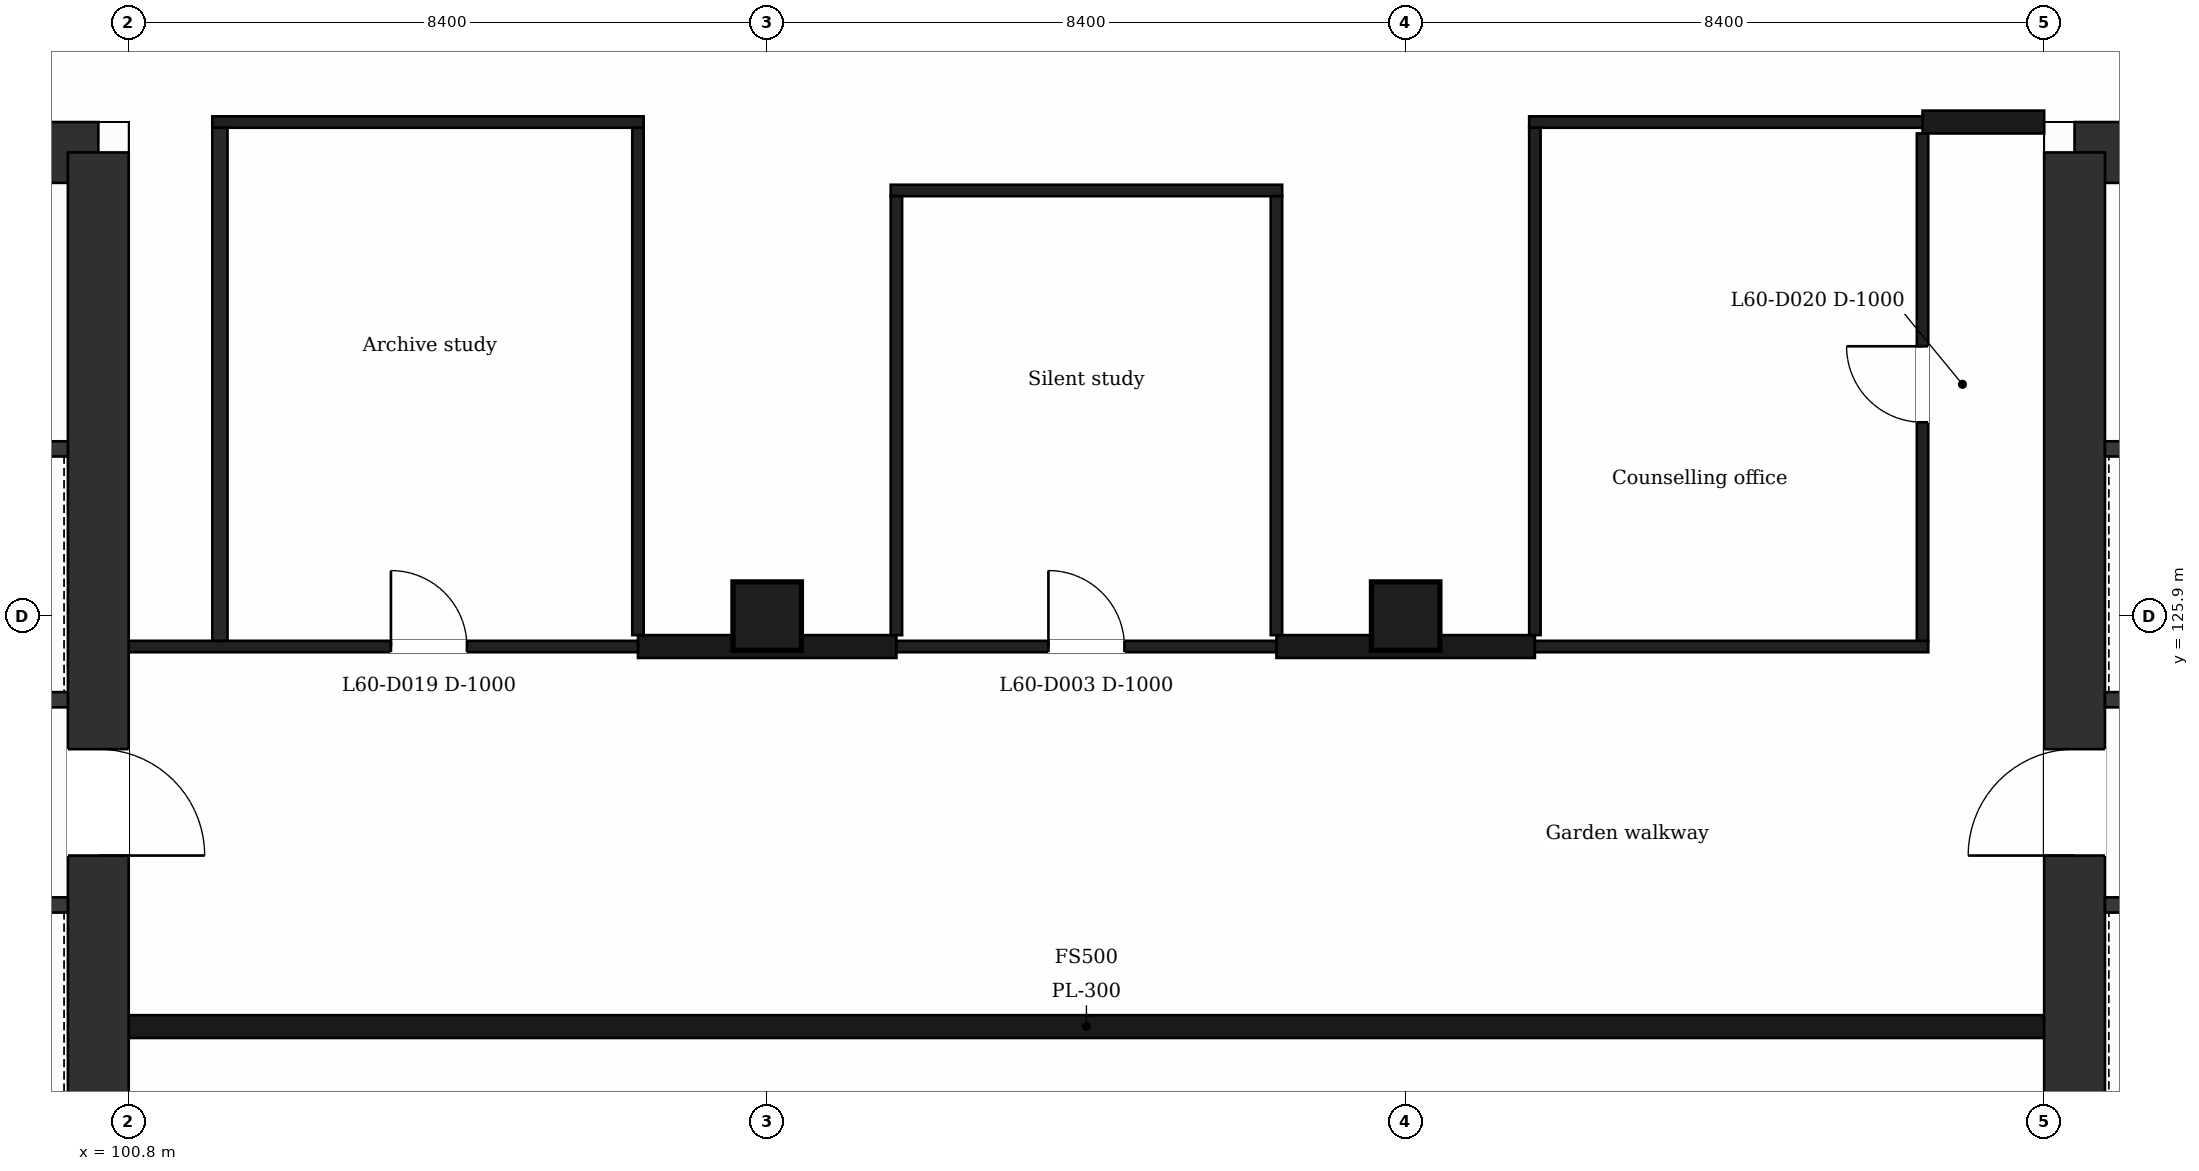
"""IFC4 building model, lengths in metres.
Left out: names, types, materials, properties, quantities, classifications, styles, units other than length and angle.
Written with IfcOpenShell. Run it as: python <this file> out.ifc"""

import sys

from ifc_helpers import new_model, si_unit, direction, frame, frame_2d, origin, origin_2d, place, context, subcontext, project, spatial, rectangle, extrude, element, fill, save


model = new_model("IFC4")
c1 = context("Model", 3, precision=1e-05, world=origin(), true_north=direction((0.0, 1.0)))
c2 = subcontext(c1, "Body", "Model", "MODEL_VIEW")
j1 = project(units=[si_unit("LENGTHUNIT", "METRE"), si_unit("PLANEANGLEUNIT", "RADIAN")], contexts=[c1])
p1 = place(None, origin())
s1 = spatial("IfcSite", under=j1, at=p1, CompositionType="ELEMENT")
p2 = place(p1, origin())
s2 = spatial("IfcBuilding", under=s1, at=p2, CompositionType="ELEMENT")
p3 = place(p2, frame((0.0, 0.0, 246.6)))
s3 = spatial("IfcBuildingStorey", under=s2, at=p3, CompositionType="ELEMENT", Elevation=246.6)
p4 = place(p3, frame((88.98, 132.0, 0.0), z_axis=(0.0, 0.0, 1.0), x_axis=(1.0, 0.0, 0.0)))
e1 = element("IfcWall", 1, at=p4, inside=s3, PredefinedType="SHEAR", context=c2, shape_type="SweptSolid", body=[
    extrude(rectangle(XDim=11.419, YDim=0.8, at=frame_2d((5.71, 0.0))), origin(), (0.0, 0.0, 1.0), 7.4),
])
p5 = place(p4, frame((6.833, 0.0, 0.0)))
e2 = element("IfcOpeningElement", 2, at=p5, cuts=e1, PredefinedType="OPENING", context=c2, shape_type="SweptSolid", body=[
    extrude(rectangle(XDim=1.2, YDim=2.1, at=frame_2d((0.6, 1.05))), frame((0.0, 0.41, 0.0), z_axis=(0.0, -1.0, 0.0), x_axis=(1.0, 0.0, 0.0)), (0.0, 0.0, 1.0), 0.82),
])
p6 = place(p3, frame((100.4, 132.0, 0.0), z_axis=(0.0, 0.0, 1.0), x_axis=(0.0, -1.0, 0.0)))
e3 = element("IfcWall", 3, at=p6, inside=s3, PredefinedType="SHEAR", context=c2, shape_type="SweptSolid", body=[
    extrude(rectangle(XDim=21.2, YDim=0.8, at=frame_2d((10.6, 0.0))), origin(), (0.0, 0.0, 1.0), 7.4),
])
p7 = place(p6, frame((7.85, 0.0, 0.0)))
e4 = element("IfcOpeningElement", 4, at=p7, cuts=e3, PredefinedType="OPENING", context=c2, shape_type="SweptSolid", body=[
    extrude(rectangle(XDim=1.4, YDim=2.1, at=frame_2d((0.7, 1.05))), frame((0.0, 0.41, 0.0), z_axis=(0.0, -1.0, 0.0), x_axis=(1.0, 0.0, 0.0)), (0.0, 0.0, 1.0), 0.82),
])
p8 = place(p3, frame((126.4, 132.0, 0.0), z_axis=(0.0, 0.0, 1.0), x_axis=(1.0, 0.0, 0.0)))
e5 = element("IfcWall", 5, at=p8, inside=s3, PredefinedType="SHEAR", context=c2, shape_type="SweptSolid", body=[
    extrude(rectangle(XDim=11.42, YDim=0.8, at=frame_2d((5.71, 0.0))), origin(), (0.0, 0.0, 1.0), 7.4),
])
p9 = place(p8, frame((3.386, 0.0, 0.0)))
e6 = element("IfcOpeningElement", 6, at=p9, cuts=e5, PredefinedType="OPENING", context=c2, shape_type="SweptSolid", body=[
    extrude(rectangle(XDim=1.2, YDim=2.1, at=frame_2d((0.6, 1.05))), frame((0.0, 0.41, 0.0), z_axis=(0.0, -1.0, 0.0), x_axis=(1.0, 0.0, 0.0)), (0.0, 0.0, 1.0), 0.82),
])
p10 = place(p3, frame((126.4, 110.8, 0.0), z_axis=(0.0, 0.0, 1.0), x_axis=(0.0, 1.0, 0.0)))
e7 = element("IfcWall", 7, at=p10, inside=s3, PredefinedType="SHEAR", context=c2, shape_type="SweptSolid", body=[
    extrude(rectangle(XDim=21.2, YDim=0.8, at=frame_2d((10.6, 0.0))), origin(), (0.0, 0.0, 1.0), 7.4),
])
p11 = place(p10, frame((11.95, 0.0, 0.0)))
e8 = element("IfcOpeningElement", 8, at=p11, cuts=e7, PredefinedType="OPENING", context=c2, shape_type="SweptSolid", body=[
    extrude(rectangle(XDim=1.4, YDim=2.1, at=frame_2d((0.7, 1.05))), frame((0.0, 0.41, 0.0), z_axis=(0.0, -1.0, 0.0), x_axis=(1.0, 0.0, 0.0)), (0.0, 0.0, 1.0), 0.82),
])
for number, where, z_axis, x_axis in (
    (9, (109.2, 125.9, 0.0), (0.0, 0.0, 1.0), (1.0, 0.0, 0.0)),
    (10, (117.6, 125.9, 0.0), (0.0, 0.0, 1.0), (1.0, 0.0, 0.0)),
):
    element("IfcColumn", number, at=place(p3, frame(where, z_axis=z_axis, x_axis=x_axis)), inside=s3, PredefinedType="COLUMN", context=c2, shape_type="SweptSolid", body=[
        extrude(rectangle(XDim=0.9, YDim=0.9, at=origin_2d()), origin(), (0.0, 0.0, 1.0), 7.4),
    ])
p12 = place(p3, frame((100.8, 120.5, 0.0), z_axis=(0.0, 0.0, 1.0), x_axis=(1.0, 0.0, 0.0)))
e11 = element("IfcWall", 11, at=p12, inside=s3, PredefinedType="PARTITIONING", context=c2, shape_type="SweptSolid", body=[
    extrude(rectangle(XDim=25.2, YDim=0.3, at=frame_2d((12.6, 0.0))), origin(), (0.0, 0.0, 1.0), 1.0),
])
p13 = place(p3, frame((95.227, 122.1, 0.0), z_axis=(0.0, 0.0, 1.0), x_axis=(1.0, 0.0, 0.0)))
e12 = element("IfcWall", 12, at=p13, inside=s3, PredefinedType="PARTITIONING", context=c2, shape_type="SweptSolid", body=[
    extrude(rectangle(XDim=4.773, YDim=0.2, at=frame_2d((2.386, 0.0))), origin(), (0.0, 0.0, 1.0), 6.9),
])
p14 = place(p13, frame((0.497, 0.0, 0.0)))
e13 = element("IfcOpeningElement", 13, at=p14, cuts=e12, PredefinedType="OPENING", context=c2, shape_type="SweptSolid", body=[
    extrude(rectangle(XDim=1.1, YDim=2.1, at=frame_2d((0.55, 1.05))), frame((0.0, 0.11, 0.0), z_axis=(0.0, -1.0, 0.0), x_axis=(1.0, 0.0, 0.0)), (0.0, 0.0, 1.0), 0.22),
])
p15 = place(p13, frame((3.176, 0.0, 0.0)))
e14 = element("IfcOpeningElement", 14, at=p15, cuts=e12, PredefinedType="OPENING", context=c2, shape_type="SweptSolid", body=[
    extrude(rectangle(XDim=1.1, YDim=2.1, at=frame_2d((0.55, 1.05))), frame((0.0, 0.11, 0.0), z_axis=(0.0, -1.0, 0.0), x_axis=(1.0, 0.0, 0.0)), (0.0, 0.0, 1.0), 0.22),
])
p16 = place(p3, frame((126.8, 122.1, 0.0), z_axis=(0.0, 0.0, 1.0), x_axis=(1.0, 0.0, 0.0)))
e15 = element("IfcWall", 15, at=p16, inside=s3, PredefinedType="PARTITIONING", context=c2, shape_type="SweptSolid", body=[
    extrude(rectangle(XDim=4.773, YDim=0.2, at=frame_2d((2.386, 0.0))), origin(), (0.0, 0.0, 1.0), 6.9),
])
p17 = place(p16, frame((3.088, 0.0, 0.0)))
e16 = element("IfcOpeningElement", 16, at=p17, cuts=e15, PredefinedType="OPENING", context=c2, shape_type="SweptSolid", body=[
    extrude(rectangle(XDim=1.1, YDim=2.1, at=frame_2d((0.55, 1.05))), frame((0.0, 0.11, 0.0), z_axis=(0.0, -1.0, 0.0), x_axis=(1.0, 0.0, 0.0)), (0.0, 0.0, 1.0), 0.22),
])
p18 = place(p16, frame((0.79, 0.0, 0.0)))
e17 = element("IfcOpeningElement", 17, at=p18, cuts=e15, PredefinedType="OPENING", context=c2, shape_type="SweptSolid", body=[
    extrude(rectangle(XDim=1.1, YDim=2.1, at=frame_2d((0.55, 1.05))), frame((0.0, 0.11, 0.0), z_axis=(0.0, -1.0, 0.0), x_axis=(1.0, 0.0, 0.0)), (0.0, 0.0, 1.0), 0.22),
])
p19 = place(p3, frame((92.702, 124.8, 0.0), z_axis=(0.0, 0.0, 1.0), x_axis=(1.0, 0.0, 0.0)))
e18 = element("IfcWall", 18, at=p19, inside=s3, PredefinedType="PARTITIONING", context=c2, shape_type="SweptSolid", body=[
    extrude(rectangle(XDim=7.298, YDim=0.2, at=frame_2d((3.649, 0.0))), origin(), (0.0, 0.0, 1.0), 6.9),
])
p20 = place(p19, frame((5.552, 0.0, 0.0)))
e19 = element("IfcOpeningElement", 19, at=p20, cuts=e18, PredefinedType="OPENING", context=c2, shape_type="SweptSolid", body=[
    extrude(rectangle(XDim=1.1, YDim=2.1, at=frame_2d((0.55, 1.05))), frame((0.0, 0.11, 0.0), z_axis=(0.0, -1.0, 0.0), x_axis=(1.0, 0.0, 0.0)), (0.0, 0.0, 1.0), 0.22),
])
p21 = place(p3, frame((126.8, 124.8, 0.0), z_axis=(0.0, 0.0, 1.0), x_axis=(1.0, 0.0, 0.0)))
e20 = element("IfcWall", 20, at=p21, inside=s3, PredefinedType="PARTITIONING", context=c2, shape_type="SweptSolid", body=[
    extrude(rectangle(XDim=4.782, YDim=0.2, at=frame_2d((2.391, 0.0))), origin(), (0.0, 0.0, 1.0), 6.9),
])
p22 = place(p21, frame((0.705, 0.0, 0.0)))
e21 = element("IfcOpeningElement", 21, at=p22, cuts=e20, PredefinedType="OPENING", context=c2, shape_type="SweptSolid", body=[
    extrude(rectangle(XDim=1.1, YDim=2.1, at=frame_2d((0.55, 1.05))), frame((0.0, 0.11, 0.0), z_axis=(0.0, -1.0, 0.0), x_axis=(1.0, 0.0, 0.0)), (0.0, 0.0, 1.0), 0.22),
])
p23 = place(p3, frame((107.5, 125.5, 0.0), z_axis=(0.0, 0.0, 1.0), x_axis=(1.0, 0.0, 0.0)))
e22 = element("IfcWall", 22, at=p23, inside=s3, PredefinedType="PARTITIONING", context=c2, shape_type="SweptSolid", body=[
    extrude(rectangle(XDim=3.4, YDim=0.3, at=frame_2d((1.7, 0.0))), origin(), (0.0, 0.0, 1.0), 1.0),
])
p24 = place(p3, frame((115.9, 125.5, 0.0), z_axis=(0.0, 0.0, 1.0), x_axis=(1.0, 0.0, 0.0)))
e23 = element("IfcWall", 23, at=p24, inside=s3, PredefinedType="PARTITIONING", context=c2, shape_type="SweptSolid", body=[
    extrude(rectangle(XDim=3.4, YDim=0.3, at=frame_2d((1.7, 0.0))), origin(), (0.0, 0.0, 1.0), 1.0),
])
p25 = place(p3, frame((100.8, 125.5, 0.0), z_axis=(0.0, 0.0, 1.0), x_axis=(1.0, 0.0, 0.0)))
e24 = element("IfcWall", 24, at=p25, inside=s3, PredefinedType="PARTITIONING", context=c2, shape_type="SweptSolid", body=[
    extrude(rectangle(XDim=6.7, YDim=0.15, at=frame_2d((3.35, 0.0))), origin(), (0.0, 0.0, 1.0), 6.9),
])
p26 = place(p25, frame((3.45, 0.0, 0.0)))
e25 = element("IfcOpeningElement", 25, at=p26, cuts=e24, PredefinedType="OPENING", context=c2, shape_type="SweptSolid", body=[
    extrude(rectangle(XDim=1.0, YDim=2.1, at=frame_2d((0.5, 1.05))), frame((0.0, 0.085, 0.0), z_axis=(0.0, -1.0, 0.0), x_axis=(1.0, 0.0, 0.0)), (0.0, 0.0, 1.0), 0.17),
])
p27 = place(p3, frame((110.9, 125.5, 0.0), z_axis=(0.0, 0.0, 1.0), x_axis=(1.0, 0.0, 0.0)))
e26 = element("IfcWall", 26, at=p27, inside=s3, PredefinedType="PARTITIONING", context=c2, shape_type="SweptSolid", body=[
    extrude(rectangle(XDim=5.0, YDim=0.15, at=frame_2d((2.5, 0.0))), origin(), (0.0, 0.0, 1.0), 6.9),
])
p28 = place(p27, frame((2.0, 0.0, 0.0)))
e27 = element("IfcOpeningElement", 27, at=p28, cuts=e26, PredefinedType="OPENING", context=c2, shape_type="SweptSolid", body=[
    extrude(rectangle(XDim=1.0, YDim=2.1, at=frame_2d((0.5, 1.05))), frame((0.0, 0.085, 0.0), z_axis=(0.0, -1.0, 0.0), x_axis=(1.0, 0.0, 0.0)), (0.0, 0.0, 1.0), 0.17),
])
p29 = place(p3, frame((119.3, 125.5, 0.0), z_axis=(0.0, 0.0, 1.0), x_axis=(1.0, 0.0, 0.0)))
e28 = element("IfcWall", 28, at=p29, inside=s3, PredefinedType="PARTITIONING", context=c2, shape_type="SweptSolid", body=[
    extrude(rectangle(XDim=5.175, YDim=0.15, at=frame_2d((2.587, 0.0))), origin(), (0.0, 0.0, 1.0), 6.9),
])
p30 = place(p3, frame((92.827, 128.1, 0.0), z_axis=(0.0, 0.0, 1.0), x_axis=(1.0, 0.0, 0.0)))
e29 = element("IfcWall", 29, at=p30, inside=s3, PredefinedType="PARTITIONING", context=c2, shape_type="SweptSolid", body=[
    extrude(rectangle(XDim=7.173, YDim=0.2, at=frame_2d((3.586, 0.0))), origin(), (0.0, 0.0, 1.0), 6.9),
])
p31 = place(p30, frame((3.036, 0.0, 0.0)))
e30 = element("IfcOpeningElement", 30, at=p31, cuts=e29, PredefinedType="OPENING", context=c2, shape_type="SweptSolid", body=[
    extrude(rectangle(XDim=1.1, YDim=2.1, at=frame_2d((0.55, 1.05))), frame((0.0, 0.11, 0.0), z_axis=(0.0, -1.0, 0.0), x_axis=(1.0, 0.0, 0.0)), (0.0, 0.0, 1.0), 0.22),
])
p32 = place(p3, frame((126.8, 128.1, 0.0), z_axis=(0.0, 0.0, 1.0), x_axis=(1.0, 0.0, 0.0)))
e31 = element("IfcWall", 31, at=p32, inside=s3, PredefinedType="PARTITIONING", context=c2, shape_type="SweptSolid", body=[
    extrude(rectangle(XDim=4.782, YDim=0.2, at=frame_2d((2.391, 0.0))), origin(), (0.0, 0.0, 1.0), 6.9),
])
p33 = place(p32, frame((3.036, 0.0, 0.0)))
e32 = element("IfcOpeningElement", 32, at=p33, cuts=e31, PredefinedType="OPENING", context=c2, shape_type="SweptSolid", body=[
    extrude(rectangle(XDim=1.1, YDim=2.1, at=frame_2d((0.55, 1.05))), frame((0.0, 0.11, 0.0), z_axis=(0.0, -1.0, 0.0), x_axis=(1.0, 0.0, 0.0)), (0.0, 0.0, 1.0), 0.22),
])
p34 = place(p3, frame((110.825, 131.5, 0.0), z_axis=(0.0, 0.0, 1.0), x_axis=(1.0, 0.0, 0.0)))
e33 = element("IfcWall", 33, at=p34, inside=s3, PredefinedType="PARTITIONING", context=c2, shape_type="SweptSolid", body=[
    extrude(rectangle(XDim=5.15, YDim=0.15, at=frame_2d((2.575, 0.0))), origin(), (0.0, 0.0, 1.0), 6.9),
])
p35 = place(p3, frame((124.4, 132.4, 0.0), z_axis=(0.0, 0.0, 1.0), x_axis=(1.0, 0.0, 0.0)))
e34 = element("IfcWall", 34, at=p35, inside=s3, PredefinedType="PARTITIONING", context=c2, shape_type="SweptSolid", body=[
    extrude(rectangle(XDim=1.6, YDim=0.3, at=frame_2d((0.8, 0.0))), origin(), (0.0, 0.0, 1.0), 1.0),
])
p36 = place(p3, frame((101.9, 132.4, 0.0), z_axis=(0.0, 0.0, 1.0), x_axis=(1.0, 0.0, 0.0)))
e35 = element("IfcWall", 35, at=p36, inside=s3, PredefinedType="PARTITIONING", context=c2, shape_type="SweptSolid", body=[
    extrude(rectangle(XDim=5.675, YDim=0.15, at=frame_2d((2.837, 0.0))), origin(), (0.0, 0.0, 1.0), 6.9),
])
p37 = place(p3, frame((119.225, 132.4, 0.0), z_axis=(0.0, 0.0, 1.0), x_axis=(1.0, 0.0, 0.0)))
e36 = element("IfcWall", 36, at=p37, inside=s3, PredefinedType="PARTITIONING", context=c2, shape_type="SweptSolid", body=[
    extrude(rectangle(XDim=5.175, YDim=0.15, at=frame_2d((2.587, 0.0))), origin(), (0.0, 0.0, 1.0), 6.9),
])
p38 = place(p3, frame((102.0, 125.575, 0.0), z_axis=(0.0, 0.0, 1.0), x_axis=(0.0, 1.0, 0.0)))
e37 = element("IfcWall", 37, at=p38, inside=s3, PredefinedType="PARTITIONING", context=c2, shape_type="SweptSolid", body=[
    extrude(rectangle(XDim=6.75, YDim=0.2, at=frame_2d((3.375, 0.0))), origin(), (0.0, 0.0, 1.0), 6.9),
])
p39 = place(p3, frame((107.5, 125.65, 0.0), z_axis=(0.0, 0.0, 1.0), x_axis=(0.0, 1.0, 0.0)))
e38 = element("IfcWall", 38, at=p39, inside=s3, PredefinedType="PARTITIONING", context=c2, shape_type="SweptSolid", body=[
    extrude(rectangle(XDim=6.675, YDim=0.15, at=frame_2d((3.337, 0.0))), origin(), (0.0, 0.0, 1.0), 6.9),
])
for number, where, z_axis, x_axis in (
    (39, (110.9, 125.65, 0.0), (0.0, 0.0, 1.0), (0.0, 1.0, 0.0)),
    (40, (115.9, 125.65, 0.0), (0.0, 0.0, 1.0), (0.0, 1.0, 0.0)),
):
    element("IfcWall", number, at=place(p3, frame(where, z_axis=z_axis, x_axis=x_axis)), inside=s3, PredefinedType="PARTITIONING", context=c2, shape_type="SweptSolid", body=[
        extrude(rectangle(XDim=5.775, YDim=0.15, at=frame_2d((2.888, 0.0))), origin(), (0.0, 0.0, 1.0), 6.9),
    ])
p40 = place(p3, frame((119.3, 125.65, 0.0), z_axis=(0.0, 0.0, 1.0), x_axis=(0.0, 1.0, 0.0)))
e41 = element("IfcWall", 41, at=p40, inside=s3, PredefinedType="PARTITIONING", context=c2, shape_type="SweptSolid", body=[
    extrude(rectangle(XDim=6.675, YDim=0.15, at=frame_2d((3.337, 0.0))), origin(), (0.0, 0.0, 1.0), 6.9),
])
p41 = place(p3, frame((124.4, 125.575, 0.0), z_axis=(0.0, 0.0, 1.0), x_axis=(0.0, 1.0, 0.0)))
e42 = element("IfcWall", 42, at=p41, inside=s3, PredefinedType="PARTITIONING", context=c2, shape_type="SweptSolid", body=[
    extrude(rectangle(XDim=6.675, YDim=0.15, at=frame_2d((3.337, 0.0))), origin(), (0.0, 0.0, 1.0), 6.9),
])
p42 = place(p41, frame((2.875, 0.0, 0.0)))
e43 = element("IfcOpeningElement", 43, at=p42, cuts=e42, PredefinedType="OPENING", context=c2, shape_type="SweptSolid", body=[
    extrude(rectangle(XDim=1.0, YDim=2.1, at=frame_2d((0.5, 1.05))), frame((0.0, 0.085, 0.0), z_axis=(0.0, -1.0, 0.0), x_axis=(1.0, 0.0, 0.0)), (0.0, 0.0, 1.0), 0.17),
])
p43 = place(p28, origin())
e44 = element("IfcDoor", 44, at=p43, inside=s3, OperationType="SINGLE_SWING_LEFT", PredefinedType="DOOR", context=c2, shape_type="SweptSolid", body=[
    extrude(rectangle(XDim=1.0, YDim=2.1, at=frame_2d((0.5, 1.05))), frame((0.0, 0.025, 0.0), z_axis=(0.0, -1.0, 0.0), x_axis=(1.0, 0.0, 0.0)), (0.0, 0.0, 1.0), 0.05),
])
fill(e27, e44)
p44 = place(p26, origin())
e45 = element("IfcDoor", 45, at=p44, inside=s3, OperationType="SINGLE_SWING_LEFT", PredefinedType="DOOR", context=c2, shape_type="SweptSolid", body=[
    extrude(rectangle(XDim=1.0, YDim=2.1, at=frame_2d((0.5, 1.05))), frame((0.0, 0.025, 0.0), z_axis=(0.0, -1.0, 0.0), x_axis=(1.0, 0.0, 0.0)), (0.0, 0.0, 1.0), 0.05),
])
fill(e25, e45)
p45 = place(p42, origin())
e46 = element("IfcDoor", 46, at=p45, inside=s3, OperationType="SINGLE_SWING_RIGHT", PredefinedType="DOOR", context=c2, shape_type="SweptSolid", body=[
    extrude(rectangle(XDim=1.0, YDim=2.1, at=frame_2d((0.5, 1.05))), frame((0.0, 0.025, 0.0), z_axis=(0.0, -1.0, 0.0), x_axis=(1.0, 0.0, 0.0)), (0.0, 0.0, 1.0), 0.05),
])
fill(e43, e46)
p46 = place(p7, origin())
e47 = element("IfcDoor", 47, at=p46, inside=s3, OperationType="SINGLE_SWING_RIGHT", PredefinedType="DOOR", context=c2, shape_type="SweptSolid", body=[
    extrude(rectangle(XDim=1.4, YDim=2.1, at=frame_2d((0.7, 1.05))), frame((0.0, 0.025, 0.0), z_axis=(0.0, -1.0, 0.0), x_axis=(1.0, 0.0, 0.0)), (0.0, 0.0, 1.0), 0.05),
])
fill(e4, e47)
p47 = place(p11, origin())
e48 = element("IfcDoor", 48, at=p47, inside=s3, OperationType="SINGLE_SWING_LEFT", PredefinedType="DOOR", context=c2, shape_type="SweptSolid", body=[
    extrude(rectangle(XDim=1.4, YDim=2.1, at=frame_2d((0.7, 1.05))), frame((0.0, 0.025, 0.0), z_axis=(0.0, -1.0, 0.0), x_axis=(1.0, 0.0, 0.0)), (0.0, 0.0, 1.0), 0.05),
])
fill(e8, e48)
save(model, sys.argv[1])
